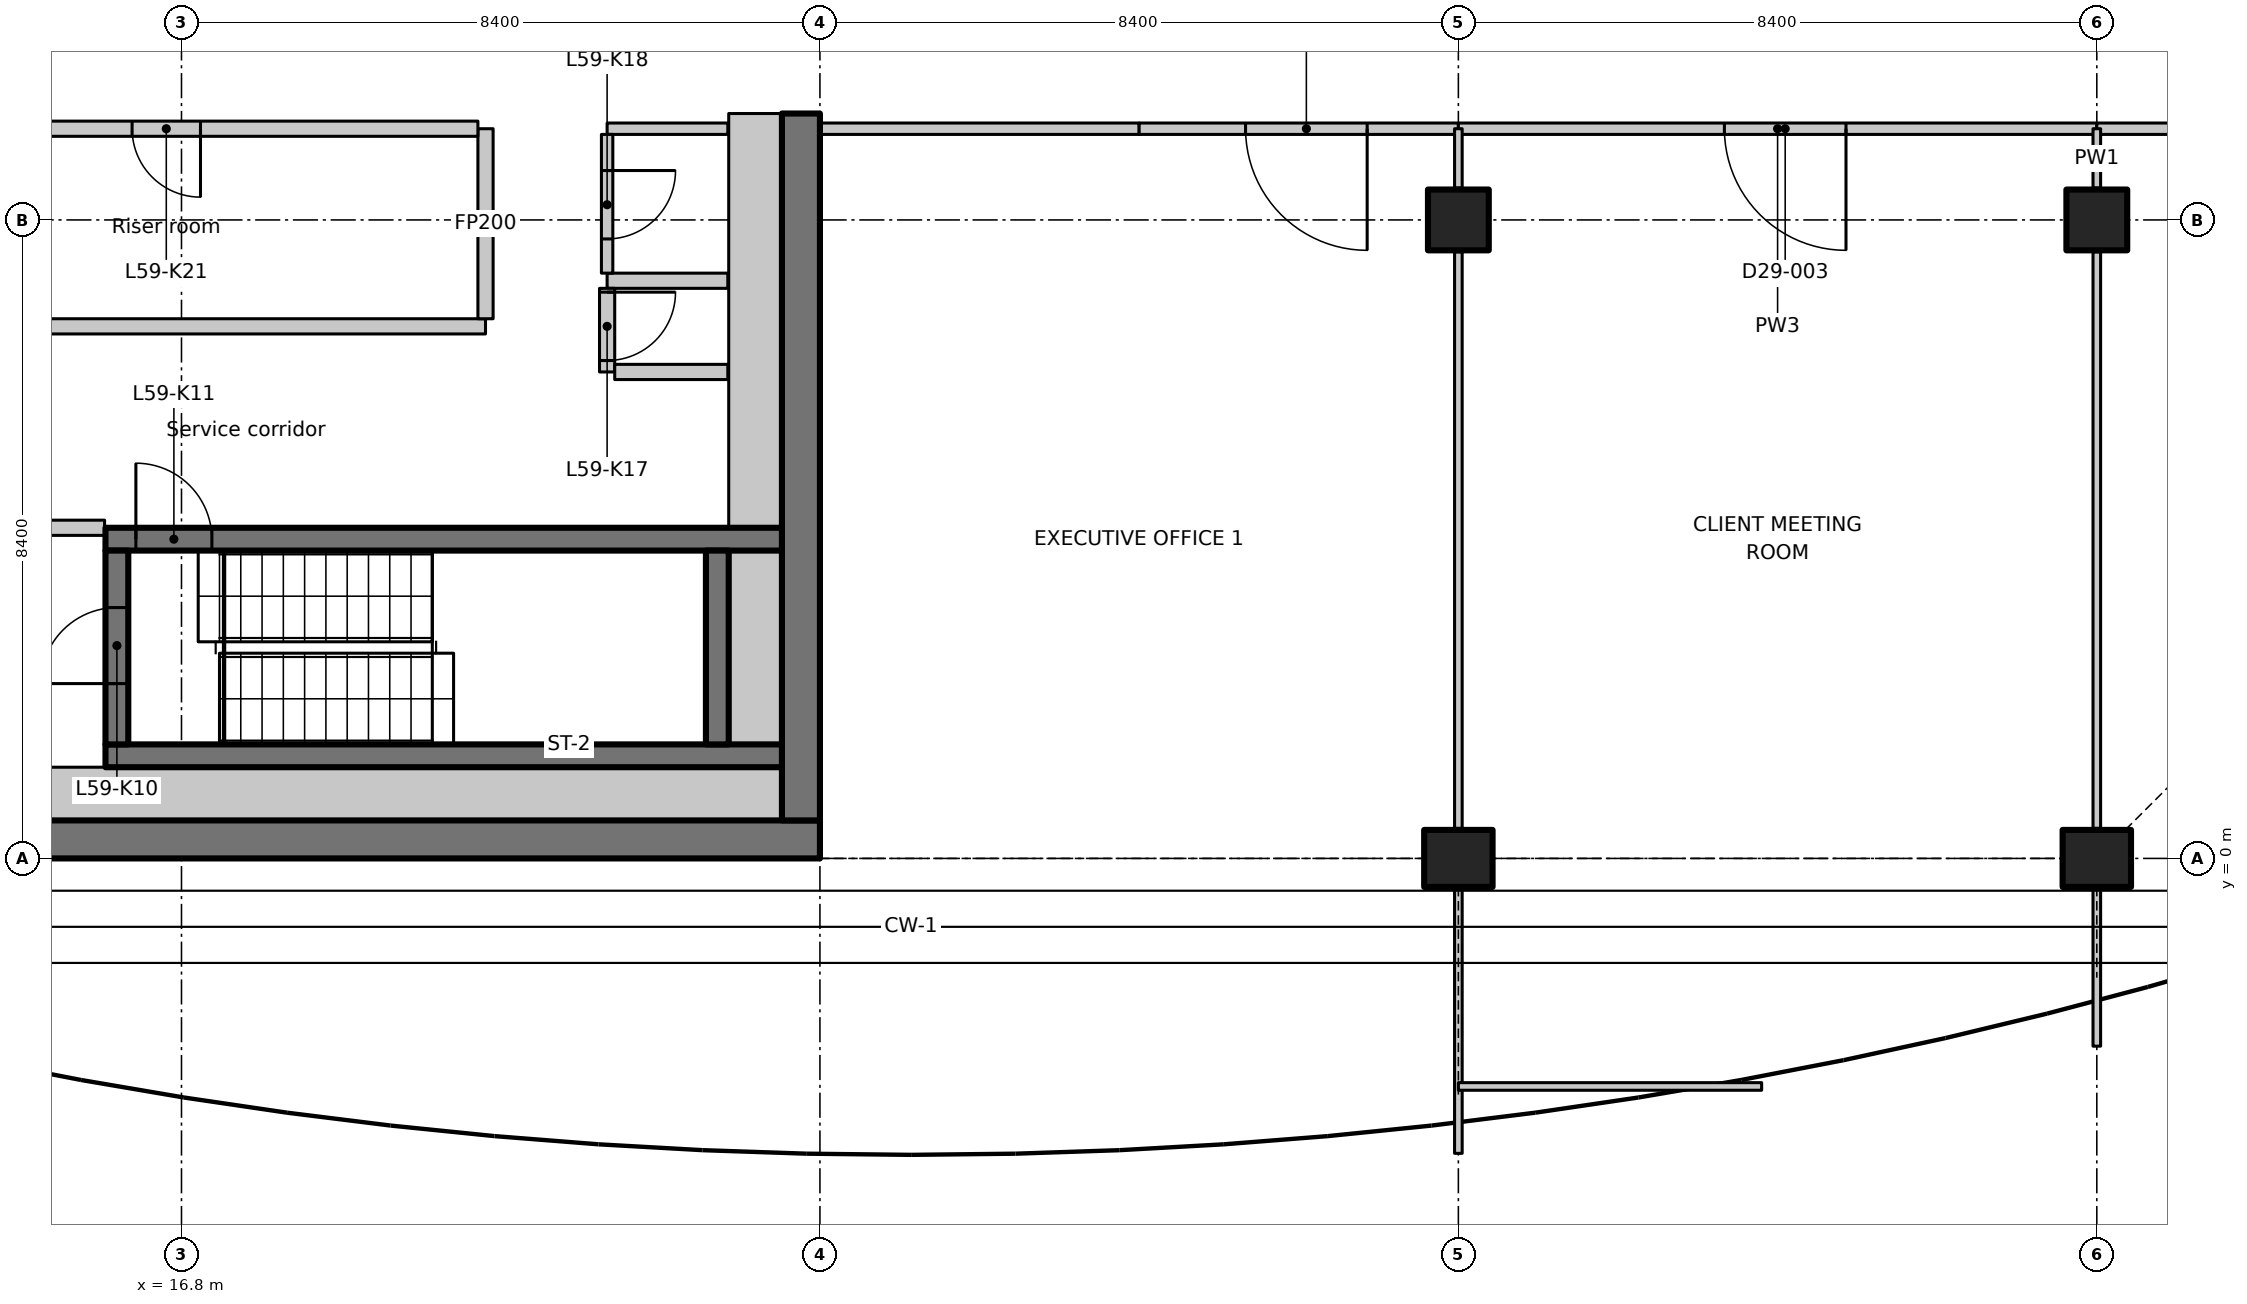
"""IFC4 building model, lengths in metres.
Left out: names, types, materials, properties, quantities, classifications, styles, units other than length and angle.
Written with IfcOpenShell. Run it as: python <this file> out.ifc"""

import sys

from ifc_helpers import new_model, si_unit, direction, frame, frame_2d, origin, origin_2d, place, context, subcontext, project, spatial, polyline, rectangle, outline, extrude, element, fill, save


model = new_model("IFC4")
c1 = context("Model", 3, precision=1e-05, world=origin(), true_north=direction((0.0, 1.0)))
c2 = subcontext(c1, "Body", "Model", "MODEL_VIEW")
j1 = project(units=[si_unit("LENGTHUNIT", "METRE"), si_unit("PLANEANGLEUNIT", "RADIAN")], contexts=[c1])
p1 = place(None, origin())
s1 = spatial("IfcSite", under=j1, at=p1, CompositionType="ELEMENT")
p2 = place(p1, origin())
s2 = spatial("IfcBuilding", under=s1, at=p2, CompositionType="ELEMENT")
p3 = place(p2, frame((0.0, 0.0, 233.7)))
s3 = spatial("IfcBuildingStorey", under=s2, at=p3, CompositionType="ELEMENT", Elevation=233.7)
p4 = place(p3, frame((33.6, 0.0, 0.0), z_axis=(0.0, 0.0, 1.0), x_axis=(0.0, 1.0, 0.0)))
e1 = element("IfcColumn", 1, at=p4, inside=s3, PredefinedType="COLUMN", context=c2, shape_type="SweptSolid", body=[
    extrude(rectangle(XDim=0.75, YDim=0.9, at=origin_2d()), origin(), (0.0, 0.0, 1.0), 3.35),
])
p5 = place(p3, frame((33.6, 8.4, 0.0), z_axis=(0.0, 0.0, 1.0), x_axis=(1.0, 0.0, 0.0)))
e2 = element("IfcColumn", 2, at=p5, inside=s3, PredefinedType="COLUMN", context=c2, shape_type="SweptSolid", body=[
    extrude(rectangle(XDim=0.8, YDim=0.8, at=origin_2d()), origin(), (0.0, 0.0, 1.0), 3.35),
])
p6 = place(p3, frame((42.0, 0.0, 0.0), z_axis=(0.0, 0.0, 1.0), x_axis=(0.0, 1.0, 0.0)))
e3 = element("IfcColumn", 3, at=p6, inside=s3, PredefinedType="COLUMN", context=c2, shape_type="SweptSolid", body=[
    extrude(rectangle(XDim=0.75, YDim=0.9, at=origin_2d()), origin(), (0.0, 0.0, 1.0), 3.35),
])
p7 = place(p3, frame((42.0, 8.4, 0.0), z_axis=(0.0, 0.0, 1.0), x_axis=(1.0, 0.0, 0.0)))
e4 = element("IfcColumn", 4, at=p7, inside=s3, PredefinedType="COLUMN", context=c2, shape_type="SweptSolid", body=[
    extrude(rectangle(XDim=0.8, YDim=0.8, at=origin_2d()), origin(), (0.0, 0.0, 1.0), 3.35),
])
p8 = place(p3, frame((7.436, 0.25, 0.0), z_axis=(0.0, 0.0, 1.0), x_axis=(1.0, 0.0, 0.0)))
e5 = element("IfcWall", 5, at=p8, inside=s3, PredefinedType="SHEAR", context=c2, shape_type="SweptSolid", body=[
    extrude(rectangle(XDim=17.764, YDim=0.5, at=frame_2d((8.882, 0.0))), origin(), (0.0, 0.0, 1.0), 3.35),
])
p9 = place(p3, frame((24.95, 0.5, 0.0), z_axis=(0.0, 0.0, 1.0), x_axis=(0.0, 1.0, 0.0)))
e6 = element("IfcWall", 6, at=p9, inside=s3, PredefinedType="SHEAR", context=c2, shape_type="SweptSolid", body=[
    extrude(rectangle(XDim=9.3, YDim=0.5, at=frame_2d((4.65, 0.0))), origin(), (0.0, 0.0, 1.0), 3.35),
])
p10 = place(p3, frame((15.8, 1.35, 0.0), z_axis=(0.0, 0.0, 1.0), x_axis=(1.0, 0.0, 0.0)))
e7 = element("IfcWall", 7, at=p10, inside=s3, PredefinedType="SHEAR", context=c2, shape_type="SweptSolid", body=[
    extrude(rectangle(XDim=8.9, YDim=0.3, at=frame_2d((4.45, 0.0))), origin(), (0.0, 0.0, 1.0), 3.35),
])
p11 = place(p3, frame((15.8, 4.2, 0.0), z_axis=(0.0, 0.0, 1.0), x_axis=(1.0, 0.0, 0.0)))
e8 = element("IfcWall", 8, at=p11, inside=s3, PredefinedType="SHEAR", context=c2, shape_type="SweptSolid", body=[
    extrude(rectangle(XDim=8.9, YDim=0.3, at=frame_2d((4.45, 0.0))), origin(), (0.0, 0.0, 1.0), 3.35),
])
p12 = place(p11, frame((0.4, 0.0, 0.0)))
e9 = element("IfcOpeningElement", 9, at=p12, cuts=e8, PredefinedType="OPENING", context=c2, shape_type="SweptSolid", body=[
    extrude(rectangle(XDim=1.0, YDim=2.1, at=frame_2d((0.5, 1.05))), frame((0.0, 0.16, 0.0), z_axis=(0.0, -1.0, 0.0), x_axis=(1.0, 0.0, 0.0)), (0.0, 0.0, 1.0), 0.32),
])
p13 = place(p3, frame((15.95, 1.5, 0.0), z_axis=(0.0, 0.0, 1.0), x_axis=(0.0, 1.0, 0.0)))
e10 = element("IfcWall", 10, at=p13, inside=s3, PredefinedType="SHEAR", context=c2, shape_type="SweptSolid", body=[
    extrude(rectangle(XDim=2.55, YDim=0.3, at=frame_2d((1.275, 0.0))), origin(), (0.0, 0.0, 1.0), 3.35),
])
p14 = place(p13, frame((0.8, 0.0, 0.0)))
e11 = element("IfcOpeningElement", 11, at=p14, cuts=e10, PredefinedType="OPENING", context=c2, shape_type="SweptSolid", body=[
    extrude(rectangle(XDim=1.0, YDim=2.1, at=frame_2d((0.5, 1.05))), frame((0.0, 0.16, 0.0), z_axis=(0.0, -1.0, 0.0), x_axis=(1.0, 0.0, 0.0)), (0.0, 0.0, 1.0), 0.32),
])
p15 = place(p3, frame((23.85, 1.5, 0.0), z_axis=(0.0, 0.0, 1.0), x_axis=(0.0, 1.0, 0.0)))
e12 = element("IfcWall", 12, at=p15, inside=s3, PredefinedType="SHEAR", context=c2, shape_type="SweptSolid", body=[
    extrude(rectangle(XDim=2.55, YDim=0.3, at=frame_2d((1.275, 0.0))), origin(), (0.0, 0.0, 1.0), 3.35),
])
p16 = place(p3, frame((13.362, 4.35, 0.0), z_axis=(0.0, 0.0, 1.0), x_axis=(1.0, 0.0, 0.0)))
e13 = element("IfcWall", 13, at=p16, inside=s3, PredefinedType="PARTITIONING", context=c2, shape_type="SweptSolid", body=[
    extrude(rectangle(XDim=2.426, YDim=0.2, at=frame_2d((1.213, 0.0))), origin(), (0.0, 0.0, 1.0), 3.35),
])
p17 = place(p16, frame((0.638, 0.0, 0.0)))
e14 = element("IfcOpeningElement", 14, at=p17, cuts=e13, PredefinedType="OPENING", context=c2, shape_type="SweptSolid", body=[
    extrude(rectangle(XDim=1.0, YDim=2.1, at=frame_2d((0.5, 1.05))), frame((0.0, 0.11, 0.0), z_axis=(0.0, -1.0, 0.0), x_axis=(1.0, 0.0, 0.0)), (0.0, 0.0, 1.0), 0.22),
])
p18 = place(p3, frame((12.4, 7.0, 0.0), z_axis=(0.0, 0.0, 1.0), x_axis=(1.0, 0.0, 0.0)))
e15 = element("IfcWall", 15, at=p18, inside=s3, PredefinedType="PARTITIONING", context=c2, shape_type="SweptSolid", body=[
    extrude(rectangle(XDim=8.4, YDim=0.2, at=frame_2d((4.2, 0.0))), origin(), (0.0, 0.0, 1.0), 3.35),
])
p19 = place(p3, frame((20.8, 7.1, 0.0), z_axis=(0.0, 0.0, 1.0), x_axis=(0.0, 1.0, 0.0)))
e16 = element("IfcWall", 16, at=p19, inside=s3, PredefinedType="PARTITIONING", context=c2, shape_type="SweptSolid", body=[
    extrude(rectangle(XDim=2.5, YDim=0.2, at=frame_2d((1.25, 0.0))), origin(), (0.0, 0.0, 1.0), 3.35),
])
p20 = place(p3, frame((20.7, 9.6, 0.0), z_axis=(0.0, 0.0, 1.0), x_axis=(-1.0, 0.0, 0.0)))
e17 = element("IfcWall", 17, at=p20, inside=s3, PredefinedType="PARTITIONING", context=c2, shape_type="SweptSolid", body=[
    extrude(rectangle(XDim=8.3, YDim=0.2, at=frame_2d((4.15, 0.0))), origin(), (0.0, 0.0, 1.0), 3.35),
])
p21 = place(p20, frame((3.65, 0.0, 0.0)))
e18 = element("IfcOpeningElement", 18, at=p21, cuts=e17, PredefinedType="OPENING", context=c2, shape_type="SweptSolid", body=[
    extrude(rectangle(XDim=0.9, YDim=2.1, at=frame_2d((0.45, 1.05))), frame((0.0, 0.11, 0.0), z_axis=(0.0, -1.0, 0.0), x_axis=(1.0, 0.0, 0.0)), (0.0, 0.0, 1.0), 0.22),
])
p22 = place(p3, frame((23.988, 7.6, 0.0), z_axis=(0.0, 0.0, 1.0), x_axis=(-1.0, 0.0, 0.0)))
e19 = element("IfcWall", 19, at=p22, inside=s3, PredefinedType="PARTITIONING", context=c2, shape_type="SweptSolid", body=[
    extrude(rectangle(XDim=1.588, YDim=0.2, at=frame_2d((0.794, 0.0))), origin(), (0.0, 0.0, 1.0), 3.35),
])
p23 = place(p3, frame((22.4, 7.5, 0.0), z_axis=(0.0, 0.0, 1.0), x_axis=(0.0, -1.0, 0.0)))
e20 = element("IfcWall", 20, at=p23, inside=s3, PredefinedType="PARTITIONING", context=c2, shape_type="SweptSolid", body=[
    extrude(rectangle(XDim=1.1, YDim=0.2, at=frame_2d((0.55, 0.0))), origin(), (0.0, 0.0, 1.0), 3.35),
])
p24 = place(p23, frame((0.05, 0.0, 0.0)))
e21 = element("IfcOpeningElement", 21, at=p24, cuts=e20, PredefinedType="OPENING", context=c2, shape_type="SweptSolid", body=[
    extrude(rectangle(XDim=0.9, YDim=2.1, at=frame_2d((0.45, 1.05))), frame((0.0, 0.11, 0.0), z_axis=(0.0, -1.0, 0.0), x_axis=(1.0, 0.0, 0.0)), (0.0, 0.0, 1.0), 0.22),
])
p25 = place(p3, frame((22.5, 6.4, 0.0), z_axis=(0.0, 0.0, 1.0), x_axis=(1.0, 0.0, 0.0)))
e22 = element("IfcWall", 22, at=p25, inside=s3, PredefinedType="PARTITIONING", context=c2, shape_type="SweptSolid", body=[
    extrude(rectangle(XDim=1.488, YDim=0.2, at=frame_2d((0.744, 0.0))), origin(), (0.0, 0.0, 1.0), 3.35),
])
p26 = place(p3, frame((23.988, 9.6, 0.0), z_axis=(0.0, 0.0, 1.0), x_axis=(-1.0, 0.0, 0.0)))
e23 = element("IfcWall", 23, at=p26, inside=s3, PredefinedType="PARTITIONING", context=c2, shape_type="SweptSolid", body=[
    extrude(rectangle(XDim=1.588, YDim=0.15, at=frame_2d((0.794, 0.0))), origin(), (0.0, 0.0, 1.0), 3.35),
])
p27 = place(p3, frame((22.4, 9.525, 0.0), z_axis=(0.0, 0.0, 1.0), x_axis=(0.0, -1.0, 0.0)))
e24 = element("IfcWall", 24, at=p27, inside=s3, PredefinedType="PARTITIONING", context=c2, shape_type="SweptSolid", body=[
    extrude(rectangle(XDim=1.825, YDim=0.15, at=frame_2d((0.913, 0.0))), origin(), (0.0, 0.0, 1.0), 3.35),
])
p28 = place(p27, frame((0.475, 0.0, 0.0)))
e25 = element("IfcOpeningElement", 25, at=p28, cuts=e24, PredefinedType="OPENING", context=c2, shape_type="SweptSolid", body=[
    extrude(rectangle(XDim=0.9, YDim=2.1, at=frame_2d((0.45, 1.05))), frame((0.0, 0.085, 0.0), z_axis=(0.0, -1.0, 0.0), x_axis=(1.0, 0.0, 0.0)), (0.0, 0.0, 1.0), 0.17),
])
p29 = place(p3, frame((13.35, 0.85, 0.0), z_axis=(0.0, 0.0, 1.0), x_axis=(1.0, 0.0, 0.0)))
e26 = element("IfcWall", 26, at=p29, inside=s3, PredefinedType="PARTITIONING", context=c2, shape_type="SweptSolid", body=[
    extrude(rectangle(XDim=11.35, YDim=0.7, at=frame_2d((5.675, 0.0))), origin(), (0.0, 0.0, 1.0), 3.35),
])
p30 = place(p3, frame((24.35, 1.5, 0.0), z_axis=(0.0, 0.0, 1.0), x_axis=(0.0, 1.0, 0.0)))
e27 = element("IfcWall", 27, at=p30, inside=s3, PredefinedType="PARTITIONING", context=c2, shape_type="SweptSolid", body=[
    extrude(rectangle(XDim=2.55, YDim=0.7, at=frame_2d((1.275, 0.0))), origin(), (0.0, 0.0, 1.0), 3.35),
])
p31 = place(p3, frame((24.35, 4.35, 0.0), z_axis=(0.0, 0.0, 1.0), x_axis=(0.0, 1.0, 0.0)))
e28 = element("IfcWall", 28, at=p31, inside=s3, PredefinedType="PARTITIONING", context=c2, shape_type="SweptSolid", body=[
    extrude(rectangle(XDim=5.45, YDim=0.7, at=frame_2d((2.725, 0.0))), origin(), (0.0, 0.0, 1.0), 3.35),
])
p32 = place(p3, frame((29.4, 9.6, 0.0), z_axis=(0.0, 0.0, 1.0), x_axis=(-1.0, 0.0, 0.0)))
e29 = element("IfcWall", 29, at=p32, inside=s3, PredefinedType="PARTITIONING", context=c2, shape_type="SweptSolid", body=[
    extrude(rectangle(XDim=4.2, YDim=0.15, at=frame_2d((2.1, 0.0))), origin(), (0.0, 0.0, 1.0), 3.33),
])
p33 = place(p3, frame((33.6, 9.6, 0.0), z_axis=(0.0, 0.0, 1.0), x_axis=(-1.0, 0.0, 0.0)))
e30 = element("IfcWall", 30, at=p33, inside=s3, PredefinedType="PARTITIONING", context=c2, shape_type="SweptSolid", body=[
    extrude(rectangle(XDim=4.2, YDim=0.15, at=frame_2d((2.1, 0.0))), origin(), (0.0, 0.0, 1.0), 3.33),
])
p34 = place(p33, frame((1.2, 0.0, 0.0)))
e31 = element("IfcOpeningElement", 31, at=p34, cuts=e30, PredefinedType="OPENING", context=c2, shape_type="SweptSolid", body=[
    extrude(rectangle(XDim=1.6, YDim=2.1, at=frame_2d((0.8, 1.05))), frame((0.0, 0.085, 0.0), z_axis=(0.0, -1.0, 0.0), x_axis=(1.0, 0.0, 0.0)), (0.0, 0.0, 1.0), 0.17),
])
p35 = place(p3, frame((42.0, 9.6, 0.0), z_axis=(0.0, 0.0, 1.0), x_axis=(-1.0, 0.0, 0.0)))
e32 = element("IfcWall", 32, at=p35, inside=s3, PredefinedType="PARTITIONING", context=c2, shape_type="SweptSolid", body=[
    extrude(rectangle(XDim=8.4, YDim=0.15, at=frame_2d((4.2, 0.0))), origin(), (0.0, 0.0, 1.0), 3.33),
])
p36 = place(p35, frame((3.3, 0.0, 0.0)))
e33 = element("IfcOpeningElement", 33, at=p36, cuts=e32, PredefinedType="OPENING", context=c2, shape_type="SweptSolid", body=[
    extrude(rectangle(XDim=1.6, YDim=2.1, at=frame_2d((0.8, 1.05))), frame((0.0, 0.085, 0.0), z_axis=(0.0, -1.0, 0.0), x_axis=(1.0, 0.0, 0.0)), (0.0, 0.0, 1.0), 0.17),
])
p37 = place(p3, frame((51.607, 9.6, 0.0), z_axis=(0.0, 0.0, 1.0), x_axis=(-1.0, 0.0, 0.0)))
e34 = element("IfcWall", 34, at=p37, inside=s3, PredefinedType="PARTITIONING", context=c2, shape_type="SweptSolid", body=[
    extrude(outline(polyline([(0.0, 0.0), (9.607, 0.0), (9.607, 3.33), (1.657, 3.33), (1.655, 2.98), (0.759, 2.98), (0.757, 3.33), (0.127, 3.33), (0.0, 3.33), (0.0, 0.0)])), frame((0.0, 0.075, 0.0), z_axis=(0.0, -1.0, 0.0), x_axis=(1.0, 0.0, 0.0)), (0.0, 0.0, 1.0), 0.15),
])
p38 = place(p37, frame((4.227, 0.0, 0.0)))
e35 = element("IfcOpeningElement", 35, at=p38, cuts=e34, PredefinedType="OPENING", context=c2, shape_type="SweptSolid", body=[
    extrude(rectangle(XDim=1.6, YDim=2.1, at=frame_2d((0.8, 1.05))), frame((0.0, 0.085, 0.0), z_axis=(0.0, -1.0, 0.0), x_axis=(1.0, 0.0, 0.0)), (0.0, 0.0, 1.0), 0.17),
])
p39 = place(p3, frame((33.6, 9.6, 0.0), z_axis=(0.0, 0.0, 1.0), x_axis=(0.0, -1.0, 0.0)))
e36 = element("IfcWall", 36, at=p39, inside=s3, PredefinedType="PARTITIONING", context=c2, shape_type="SweptSolid", body=[
    extrude(rectangle(XDim=0.78, YDim=0.1, at=frame_2d((0.39, 0.0))), origin(), (0.0, 0.0, 1.0), 3.33),
])
p40 = place(p3, frame((33.6, 7.98, 0.0), z_axis=(0.0, 0.0, 1.0), x_axis=(0.0, -1.0, 0.0)))
e37 = element("IfcWall", 37, at=p40, inside=s3, PredefinedType="PARTITIONING", context=c2, shape_type="SweptSolid", body=[
    extrude(outline(polyline([(0.0, 0.0), (7.585, 0.0), (7.585, 2.98), (7.532, 2.98), (7.53, 3.33), (0.0, 3.33), (0.0, 0.0)])), frame((0.0, 0.05, 0.0), z_axis=(0.0, -1.0, 0.0), x_axis=(1.0, 0.0, 0.0)), (0.0, 0.0, 1.0), 0.1),
])
p41 = place(p3, frame((33.6, -0.395, 0.0), z_axis=(0.0, 0.0, 1.0), x_axis=(0.0, -1.0, 0.0)))
e38 = element("IfcWall", 38, at=p41, inside=s3, PredefinedType="PARTITIONING", context=c2, shape_type="SweptSolid", body=[
    extrude(rectangle(XDim=3.485, YDim=0.1, at=frame_2d((1.743, 0.0))), origin(), (0.0, 0.0, 1.0), 2.98),
])
p42 = place(p3, frame((33.6, -3.0, 0.0), z_axis=(0.0, 0.0, 1.0), x_axis=(1.0, 0.0, 0.0)))
e39 = element("IfcWall", 39, at=p42, inside=s3, PredefinedType="PARTITIONING", context=c2, shape_type="SweptSolid", body=[
    extrude(rectangle(XDim=3.99, YDim=0.1, at=frame_2d((1.995, 0.0))), origin(), (0.0, 0.0, 1.0), 2.98),
])
p43 = place(p3, frame((42.0, 9.6, 0.0), z_axis=(0.0, 0.0, 1.0), x_axis=(0.0, -1.0, 0.0)))
e40 = element("IfcWall", 40, at=p43, inside=s3, PredefinedType="PARTITIONING", context=c2, shape_type="SweptSolid", body=[
    extrude(rectangle(XDim=0.78, YDim=0.1, at=frame_2d((0.39, 0.0))), origin(), (0.0, 0.0, 1.0), 3.33),
])
p44 = place(p3, frame((42.0, 7.98, 0.0), z_axis=(0.0, 0.0, 1.0), x_axis=(0.0, -1.0, 0.0)))
e41 = element("IfcWall", 41, at=p44, inside=s3, PredefinedType="PARTITIONING", context=c2, shape_type="SweptSolid", body=[
    extrude(outline(polyline([(0.0, 0.0), (7.585, 0.0), (7.585, 2.98), (7.316, 2.98), (7.314, 3.33), (0.0, 3.33), (0.0, 0.0)])), frame((0.0, 0.05, 0.0), z_axis=(0.0, -1.0, 0.0), x_axis=(1.0, 0.0, 0.0)), (0.0, 0.0, 1.0), 0.1),
])
p45 = place(p3, frame((42.0, -0.395, 0.0), z_axis=(0.0, 0.0, 1.0), x_axis=(0.0, -1.0, 0.0)))
e42 = element("IfcWall", 42, at=p45, inside=s3, PredefinedType="PARTITIONING", context=c2, shape_type="SweptSolid", body=[
    extrude(rectangle(XDim=2.075, YDim=0.1, at=frame_2d((1.038, 0.0))), origin(), (0.0, 0.0, 1.0), 2.98),
])
p46 = place(p14, origin())
e43 = element("IfcDoor", 43, at=p46, inside=s3, OperationType="SINGLE_SWING_LEFT", PredefinedType="DOOR", context=c2, shape_type="SweptSolid", body=[
    extrude(rectangle(XDim=1.0, YDim=2.1, at=frame_2d((0.5, 1.05))), frame((0.0, 0.025, 0.0), z_axis=(0.0, -1.0, 0.0), x_axis=(1.0, 0.0, 0.0)), (0.0, 0.0, 1.0), 0.05),
])
fill(e11, e43)
p47 = place(p12, origin())
e44 = element("IfcDoor", 44, at=p47, inside=s3, OperationType="SINGLE_SWING_RIGHT", PredefinedType="DOOR", context=c2, shape_type="SweptSolid", body=[
    extrude(rectangle(XDim=1.0, YDim=2.1, at=frame_2d((0.5, 1.05))), frame((0.0, 0.025, 0.0), z_axis=(0.0, -1.0, 0.0), x_axis=(1.0, 0.0, 0.0)), (0.0, 0.0, 1.0), 0.05),
])
fill(e9, e44)
p48 = place(p24, origin())
e45 = element("IfcDoor", 45, at=p48, inside=s3, OperationType="SINGLE_SWING_RIGHT", PredefinedType="DOOR", context=c2, shape_type="SweptSolid", body=[
    extrude(rectangle(XDim=0.9, YDim=2.1, at=frame_2d((0.45, 1.05))), frame((0.0, 0.025, 0.0), z_axis=(0.0, -1.0, 0.0), x_axis=(1.0, 0.0, 0.0)), (0.0, 0.0, 1.0), 0.05),
])
fill(e21, e45)
p49 = place(p28, origin())
e46 = element("IfcDoor", 46, at=p49, inside=s3, OperationType="SINGLE_SWING_LEFT", PredefinedType="DOOR", context=c2, shape_type="SweptSolid", body=[
    extrude(rectangle(XDim=0.9, YDim=2.1, at=frame_2d((0.45, 1.05))), frame((0.0, 0.025, 0.0), z_axis=(0.0, -1.0, 0.0), x_axis=(1.0, 0.0, 0.0)), (0.0, 0.0, 1.0), 0.05),
])
fill(e25, e46)
p50 = place(p21, origin())
e47 = element("IfcDoor", 47, at=p50, inside=s3, OperationType="SINGLE_SWING_RIGHT", PredefinedType="DOOR", context=c2, shape_type="SweptSolid", body=[
    extrude(rectangle(XDim=0.9, YDim=2.1, at=frame_2d((0.45, 1.05))), frame((0.0, 0.025, 0.0), z_axis=(0.0, -1.0, 0.0), x_axis=(1.0, 0.0, 0.0)), (0.0, 0.0, 1.0), 0.05),
])
fill(e18, e47)
p51 = place(p34, origin())
e48 = element("IfcDoor", 48, at=p51, inside=s3, OperationType="DOUBLE_DOOR_SINGLE_SWING", PredefinedType="DOOR", context=c2, shape_type="SweptSolid", body=[
    extrude(rectangle(XDim=1.6, YDim=2.1, at=frame_2d((0.8, 1.05))), frame((0.0, 0.025, 0.0), z_axis=(0.0, -1.0, 0.0), x_axis=(1.0, 0.0, 0.0)), (0.0, 0.0, 1.0), 0.05),
])
fill(e31, e48)
p52 = place(p36, origin())
e49 = element("IfcDoor", 49, at=p52, inside=s3, OperationType="DOUBLE_DOOR_SINGLE_SWING", PredefinedType="DOOR", context=c2, shape_type="SweptSolid", body=[
    extrude(rectangle(XDim=1.6, YDim=2.1, at=frame_2d((0.8, 1.05))), frame((0.0, 0.025, 0.0), z_axis=(0.0, -1.0, 0.0), x_axis=(1.0, 0.0, 0.0)), (0.0, 0.0, 1.0), 0.05),
])
fill(e33, e49)
save(model, sys.argv[1])
